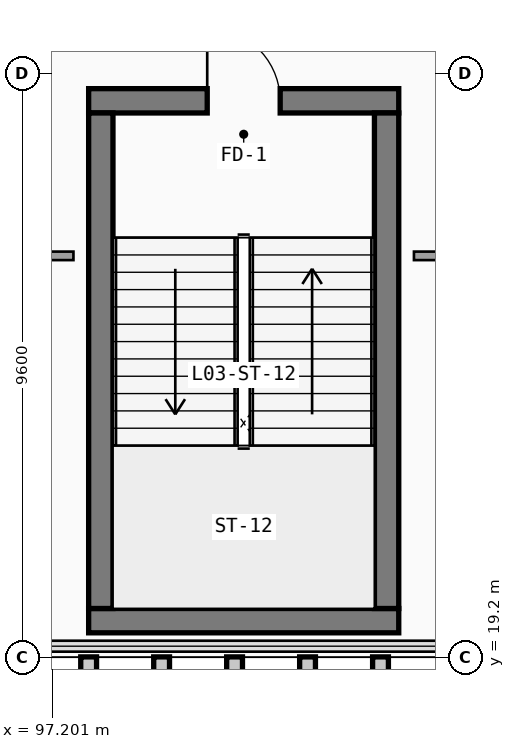
"""IFC4 building model, lengths in metres.
Left out: names, types, materials, properties, quantities, classifications, styles, units other than length and angle.
Written with IfcOpenShell. Run it as: python <this file> out.ifc"""

import sys

from ifc_helpers import new_model, si_unit, direction, frame, frame_2d, origin, place, context, subcontext, project, spatial, rectangle, extrude, element, fill, save


model = new_model("IFC4")
c1 = context("Model", 3, precision=1e-05, world=origin(), true_north=direction((0.0, 1.0)))
c2 = subcontext(c1, "Body", "Model", "MODEL_VIEW")
j1 = project(units=[si_unit("LENGTHUNIT", "METRE"), si_unit("PLANEANGLEUNIT", "RADIAN")], contexts=[c1])
p1 = place(None, origin())
s1 = spatial("IfcSite", under=j1, at=p1, CompositionType="ELEMENT")
p2 = place(p1, origin())
s2 = spatial("IfcBuilding", under=s1, at=p2, CompositionType="ELEMENT")
p3 = place(p2, frame((0.0, 0.0, 14.1)))
s3 = spatial("IfcBuildingStorey", under=s2, at=p3, CompositionType="ELEMENT", Elevation=14.1)
p4 = place(p3, frame((97.8, 19.8, 0.0), z_axis=(0.0, 0.0, 1.0), x_axis=(1.0, 0.0, 0.0)))
e1 = element("IfcWall", 1, at=p4, inside=s3, PredefinedType="SHEAR", context=c2, shape_type="SweptSolid", body=[
    extrude(rectangle(XDim=5.1, YDim=0.4, at=frame_2d((2.55, 0.0))), origin(), (0.0, 0.0, 1.0), 4.24),
])
p5 = place(p3, frame((102.9, 28.35, 0.0), z_axis=(0.0, 0.0, 1.0), x_axis=(-1.0, 0.0, 0.0)))
e2 = element("IfcWall", 2, at=p5, inside=s3, PredefinedType="SHEAR", context=c2, shape_type="SweptSolid", body=[
    extrude(rectangle(XDim=5.1, YDim=0.4, at=frame_2d((2.55, 0.0))), origin(), (0.0, 0.0, 1.0), 4.24),
])
p6 = place(p5, frame((3.15, 0.0, 0.0), z_axis=(0.0, 0.0, 1.0), x_axis=(-1.0, 0.0, 0.0)))
e3 = element("IfcOpeningElement", 3, at=p6, cuts=e2, PredefinedType="OPENING", context=c2, shape_type="SweptSolid", body=[
    extrude(rectangle(XDim=1.2, YDim=2.2, at=frame_2d((0.6, 1.1))), frame((0.0, 0.21, 0.0), z_axis=(0.0, -1.0, 0.0), x_axis=(1.0, 0.0, 0.0)), (0.0, 0.0, 1.0), 0.42),
])
for number, where, z_axis, x_axis in (
    (4, (98.0, 28.15, 0.0), (0.0, 0.0, 1.0), (0.0, -1.0, 0.0)),
    (5, (102.7, 20.0, 0.0), (0.0, 0.0, 1.0), (0.0, 1.0, 0.0)),
):
    element("IfcWall", number, at=place(p3, frame(where, z_axis=z_axis, x_axis=x_axis)), inside=s3, PredefinedType="SHEAR", context=c2, shape_type="SweptSolid", body=[
        extrude(rectangle(XDim=8.15, YDim=0.4, at=frame_2d((4.075, 0.0))), origin(), (0.0, 0.0, 1.0), 4.24),
    ])
p7 = place(p3, frame((106.82, 25.8, 0.0), z_axis=(0.0, 0.0, 1.0), x_axis=(-1.0, 0.0, 0.0)))
e6 = element("IfcWall", 6, at=p7, inside=s3, PredefinedType="PARTITIONING", context=c2, shape_type="SweptSolid", body=[
    extrude(rectangle(XDim=3.67, YDim=0.14, at=frame_2d((1.835, 0.0))), origin(), (0.0, 0.0, 1.0), 3.638),
])
p8 = place(p3, frame((97.55, 25.8, 0.0), z_axis=(0.0, 0.0, 1.0), x_axis=(-1.0, 0.0, 0.0)))
e7 = element("IfcWall", 7, at=p8, inside=s3, PredefinedType="PARTITIONING", context=c2, shape_type="SweptSolid", body=[
    extrude(rectangle(XDim=5.17, YDim=0.14, at=frame_2d((2.585, 0.0))), origin(), (0.0, 0.0, 1.0), 3.638),
])
p9 = place(p8, frame((2.085, 0.0, 0.0), z_axis=(0.0, 0.0, 1.0), x_axis=(1.0, 0.0, 0.0)))
e8 = element("IfcOpeningElement", 8, at=p9, cuts=e7, PredefinedType="OPENING", context=c2, shape_type="SweptSolid", body=[
    extrude(rectangle(XDim=1.0, YDim=2.2, at=frame_2d((0.5, 1.1))), frame((0.0, 0.08, 0.0), z_axis=(0.0, -1.0, 0.0), x_axis=(1.0, 0.0, 0.0)), (0.0, 0.0, 1.0), 0.16),
])
p10 = place(p6, origin())
e9 = element("IfcDoor", 9, at=p10, inside=s3, OperationType="SINGLE_SWING_LEFT", PredefinedType="DOOR", context=c2, shape_type="SweptSolid", body=[
    extrude(rectangle(XDim=1.2, YDim=2.2, at=frame_2d((0.6, 1.1))), frame((0.0, 0.025, 0.0), z_axis=(0.0, -1.0, 0.0), x_axis=(1.0, 0.0, 0.0)), (0.0, 0.0, 1.0), 0.05),
])
fill(e3, e9)
save(model, sys.argv[1])
